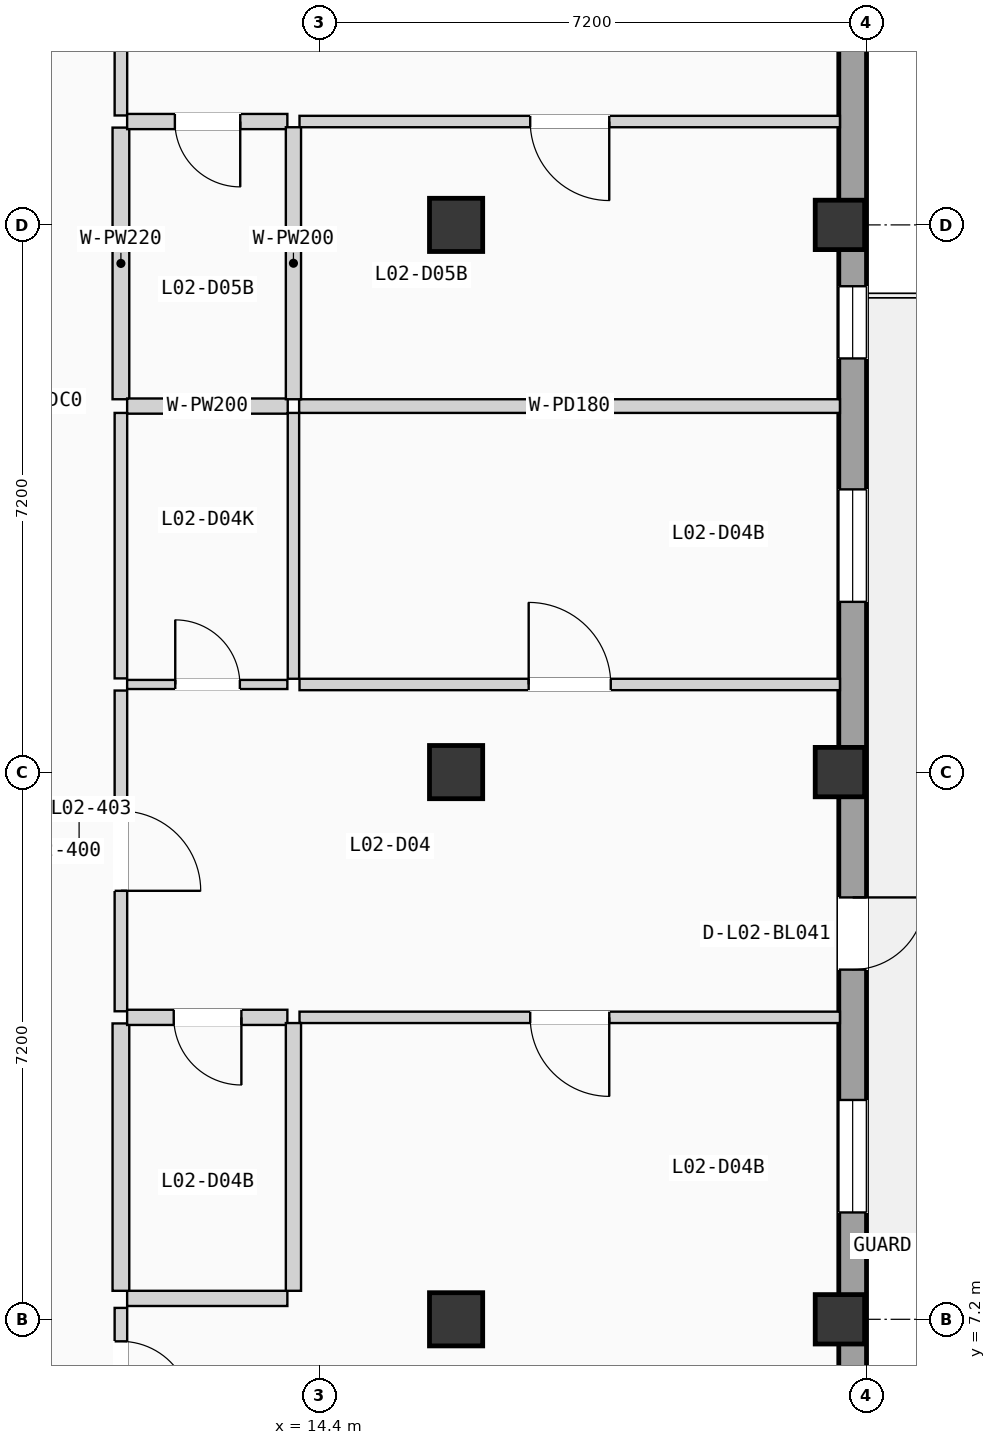
"""IFC4 building model, lengths in metres.
Left out: names, types, materials, properties, quantities, classifications, styles, units other than length and angle.
Written with IfcOpenShell. Run it as: python <this file> out.ifc"""

import sys

from ifc_helpers import new_model, si_unit, direction, frame, frame_2d, origin, origin_2d, place, context, subcontext, project, spatial, rectangle, extrude, element, fill, save


model = new_model("IFC4")
c1 = context("Model", 3, precision=1e-05, world=origin(), true_north=direction((0.0, 1.0)))
c2 = subcontext(c1, "Body", "Model", "MODEL_VIEW")
j1 = project(units=[si_unit("LENGTHUNIT", "METRE"), si_unit("PLANEANGLEUNIT", "RADIAN")], contexts=[c1])
p1 = place(None, origin())
s1 = spatial("IfcSite", under=j1, at=p1, CompositionType="ELEMENT")
p2 = place(p1, origin())
s2 = spatial("IfcBuilding", under=s1, at=p2, CompositionType="ELEMENT")
p3 = place(p2, frame((0.0, 0.0, 8.575)))
s3 = spatial("IfcBuildingStorey", under=s2, at=p3, CompositionType="ELEMENT", Elevation=8.575)
for number, where, z_axis, x_axis in (
    (1, (16.2, 7.2, 0.0), (0.0, 0.0, 1.0), (1.0, 0.0, 0.0)),
    (2, (16.2, 14.4, 0.0), (0.0, 0.0, 1.0), (1.0, 0.0, 0.0)),
    (3, (16.2, 21.6, 0.0), (0.0, 0.0, 1.0), (1.0, 0.0, 0.0)),
):
    element("IfcColumn", number, at=place(p3, frame(where, z_axis=z_axis, x_axis=x_axis)), inside=s3, PredefinedType="COLUMN", context=c2, shape_type="SweptSolid", body=[
        extrude(rectangle(XDim=0.7, YDim=0.7, at=origin_2d()), origin(), (0.0, 0.0, 1.0), 3.5),
    ])
for number, where, z_axis, x_axis in (
    (4, (21.25, 7.2, 0.0), (0.0, 0.0, 1.0), (1.0, 0.0, 0.0)),
    (5, (21.25, 14.4, 0.0), (0.0, 0.0, 1.0), (1.0, 0.0, 0.0)),
    (6, (21.25, 21.6, 0.0), (0.0, 0.0, 1.0), (1.0, 0.0, 0.0)),
):
    element("IfcColumn", number, at=place(p3, frame(where, z_axis=z_axis, x_axis=x_axis)), inside=s3, PredefinedType="COLUMN", context=c2, shape_type="SweptSolid", body=[
        extrude(rectangle(XDim=0.65, YDim=0.65, at=origin_2d()), origin(), (0.0, 0.0, 1.0), 3.5),
    ])
p4 = place(p3, frame((21.417, 0.365, 0.0), z_axis=(0.0, 0.0, 1.0), x_axis=(0.0, 1.0, 0.0)))
e7 = element("IfcWall", 7, at=p4, inside=s3, PredefinedType="SOLIDWALL", context=c2, shape_type="SweptSolid", body=[
    extrude(rectangle(XDim=49.67, YDim=0.365, at=frame_2d((24.835, 0.0))), origin(), (0.0, 0.0, 1.0), 3.24),
])
p5 = place(p4, frame((11.436, 0.0, 0.0)))
e8 = element("IfcOpeningElement", 8, at=p5, cuts=e7, PredefinedType="OPENING", context=c2, shape_type="SweptSolid", body=[
    extrude(rectangle(XDim=0.95, YDim=2.15, at=frame_2d((0.475, 1.075))), frame((0.0, 0.192, 0.0), z_axis=(0.0, -1.0, 0.0), x_axis=(1.0, 0.0, 0.0)), (0.0, 0.0, 1.0), 0.385),
])
p6 = place(p4, frame((8.241, 0.0, 0.9)))
e9 = element("IfcOpeningElement", 9, at=p6, cuts=e7, PredefinedType="OPENING", context=c2, shape_type="SweptSolid", body=[
    extrude(rectangle(XDim=1.48, YDim=1.65, at=frame_2d((0.74, 0.825))), frame((0.0, 0.192, 0.0), z_axis=(0.0, -1.0, 0.0), x_axis=(1.0, 0.0, 0.0)), (0.0, 0.0, 1.0), 0.385),
])
p7 = place(p4, frame((16.275, 0.0, 0.755)))
e10 = element("IfcOpeningElement", 10, at=p7, cuts=e7, PredefinedType="OPENING", context=c2, shape_type="SweptSolid", body=[
    extrude(rectangle(XDim=1.48, YDim=1.8, at=frame_2d((0.74, 0.9))), frame((0.0, 0.192, 0.0), z_axis=(0.0, -1.0, 0.0), x_axis=(1.0, 0.0, 0.0)), (0.0, 0.0, 1.0), 0.385),
])
p8 = place(p4, frame((24.035, 0.0, 0.9)))
e11 = element("IfcOpeningElement", 11, at=p8, cuts=e7, PredefinedType="OPENING", context=c2, shape_type="SweptSolid", body=[
    extrude(rectangle(XDim=1.6, YDim=1.2, at=frame_2d((0.8, 0.6))), frame((0.0, 0.192, 0.0), z_axis=(0.0, -1.0, 0.0), x_axis=(1.0, 0.0, 0.0)), (0.0, 0.0, 1.0), 0.385),
])
p9 = place(p4, frame((19.478, 0.0, 0.85)))
e12 = element("IfcOpeningElement", 12, at=p9, cuts=e7, PredefinedType="OPENING", context=c2, shape_type="SweptSolid", body=[
    extrude(rectangle(XDim=0.95, YDim=1.2, at=frame_2d((0.475, 0.6))), frame((0.0, 0.192, 0.0), z_axis=(0.0, -1.0, 0.0), x_axis=(1.0, 0.0, 0.0)), (0.0, 0.0, 1.0), 0.385),
])
p10 = place(p4, frame((29.242, 0.0, 0.85)))
e13 = element("IfcOpeningElement", 13, at=p10, cuts=e7, PredefinedType="OPENING", context=c2, shape_type="SweptSolid", body=[
    extrude(rectangle(XDim=0.95, YDim=1.2, at=frame_2d((0.475, 0.6))), frame((0.0, 0.192, 0.0), z_axis=(0.0, -1.0, 0.0), x_axis=(1.0, 0.0, 0.0)), (0.0, 0.0, 1.0), 0.385),
])
p11 = place(p4, frame((37.218, 0.0, 0.0)))
e14 = element("IfcOpeningElement", 14, at=p11, cuts=e7, PredefinedType="OPENING", context=c2, shape_type="SweptSolid", body=[
    extrude(rectangle(XDim=1.08, YDim=2.18, at=frame_2d((0.54, 1.09))), frame((0.0, 0.192, 0.0), z_axis=(0.0, -1.0, 0.0), x_axis=(1.0, 0.0, 0.0)), (0.0, 0.0, 1.0), 0.385),
])
p12 = place(p4, frame((31.856, 0.0, 0.9)))
e15 = element("IfcOpeningElement", 15, at=p12, cuts=e7, PredefinedType="OPENING", context=c2, shape_type="SweptSolid", body=[
    extrude(rectangle(XDim=1.6, YDim=1.65, at=frame_2d((0.8, 0.825))), frame((0.0, 0.192, 0.0), z_axis=(0.0, -1.0, 0.0), x_axis=(1.0, 0.0, 0.0)), (0.0, 0.0, 1.0), 0.385),
])
p13 = place(p4, frame((39.889, 0.0, 0.755)))
e16 = element("IfcOpeningElement", 16, at=p13, cuts=e7, PredefinedType="OPENING", context=c2, shape_type="SweptSolid", body=[
    extrude(rectangle(XDim=1.6, YDim=1.8, at=frame_2d((0.8, 0.9))), frame((0.0, 0.192, 0.0), z_axis=(0.0, -1.0, 0.0), x_axis=(1.0, 0.0, 0.0)), (0.0, 0.0, 1.0), 0.385),
])
p14 = place(p3, frame((11.79, 5.53, 0.0), z_axis=(0.0, 0.0, 1.0), x_axis=(0.0, 1.0, 0.0)))
e17 = element("IfcWall", 17, at=p14, inside=s3, PredefinedType="PARTITIONING", context=c2, shape_type="SweptSolid", body=[
    extrude(rectangle(XDim=1.82, YDim=0.165, at=frame_2d((0.91, 0.0))), origin(), (0.0, 0.0, 1.0), 3.22),
])
p15 = place(p14, frame((0.46, 0.0, 0.0)))
e18 = element("IfcOpeningElement", 18, at=p15, cuts=e17, PredefinedType="OPENING", context=c2, shape_type="SweptSolid", body=[
    extrude(rectangle(XDim=0.92, YDim=2.04, at=frame_2d((0.46, 1.02))), frame((0.0, 0.093, 0.0), z_axis=(0.0, -1.0, 0.0), x_axis=(1.0, 0.0, 0.0)), (0.0, 0.0, 1.0), 0.185),
])
p16 = place(p3, frame((11.872, 7.475, 0.0), z_axis=(0.0, 0.0, 1.0), x_axis=(1.0, 0.0, 0.0)))
e19 = element("IfcWall", 19, at=p16, inside=s3, PredefinedType="PLUMBINGWALL", context=c2, shape_type="SweptSolid", body=[
    extrude(rectangle(XDim=2.108, YDim=0.2, at=frame_2d((1.054, 0.0))), origin(), (0.0, 0.0, 1.0), 3.22),
])
p17 = place(p3, frame((11.79, 11.253, 0.0), z_axis=(0.0, 0.0, 1.0), x_axis=(0.0, 1.0, 0.0)))
e20 = element("IfcWall", 20, at=p17, inside=s3, PredefinedType="PARTITIONING", context=c2, shape_type="SweptSolid", body=[
    extrude(rectangle(XDim=4.22, YDim=0.165, at=frame_2d((2.11, 0.0))), origin(), (0.0, 0.0, 1.0), 3.22),
])
p18 = place(p17, frame((1.585, 0.0, 0.0)))
e21 = element("IfcOpeningElement", 21, at=p18, cuts=e20, PredefinedType="OPENING", context=c2, shape_type="SweptSolid", body=[
    extrude(rectangle(XDim=1.05, YDim=2.13, at=frame_2d((0.525, 1.065))), frame((0.0, 0.093, 0.0), z_axis=(0.0, -1.0, 0.0), x_axis=(1.0, 0.0, 0.0)), (0.0, 0.0, 1.0), 0.185),
])
p19 = place(p3, frame((11.79, 7.575, 0.0), z_axis=(0.0, 0.0, 1.0), x_axis=(0.0, 1.0, 0.0)))
e22 = element("IfcWall", 22, at=p19, inside=s3, PredefinedType="PLUMBINGWALL", context=c2, shape_type="SweptSolid", body=[
    extrude(rectangle(XDim=3.518, YDim=0.22, at=frame_2d((1.759, 0.0))), origin(), (0.0, 0.0, 1.0), 3.22),
])
p20 = place(p3, frame((11.79, 15.633, 0.0), z_axis=(0.0, 0.0, 1.0), x_axis=(0.0, 1.0, 0.0)))
e23 = element("IfcWall", 23, at=p20, inside=s3, PredefinedType="PARTITIONING", context=c2, shape_type="SweptSolid", body=[
    extrude(rectangle(XDim=3.493, YDim=0.165, at=frame_2d((1.747, 0.0))), origin(), (0.0, 0.0, 1.0), 3.22),
])
p21 = place(p3, frame((11.79, 23.04, 0.0), z_axis=(0.0, 0.0, 1.0), x_axis=(0.0, 1.0, 0.0)))
e24 = element("IfcWall", 24, at=p21, inside=s3, PredefinedType="PARTITIONING", context=c2, shape_type="SweptSolid", body=[
    extrude(rectangle(XDim=4.32, YDim=0.165, at=frame_2d((2.16, 0.0))), origin(), (0.0, 0.0, 1.0), 3.22),
])
p22 = place(p21, frame((1.635, 0.0, 0.0)))
e25 = element("IfcOpeningElement", 25, at=p22, cuts=e24, PredefinedType="OPENING", context=c2, shape_type="SweptSolid", body=[
    extrude(rectangle(XDim=1.05, YDim=2.13, at=frame_2d((0.525, 1.065))), frame((0.0, 0.093, 0.0), z_axis=(0.0, -1.0, 0.0), x_axis=(1.0, 0.0, 0.0)), (0.0, 0.0, 1.0), 0.185),
])
p23 = place(p3, frame((11.79, 19.306, 0.0), z_axis=(0.0, 0.0, 1.0), x_axis=(0.0, 1.0, 0.0)))
e26 = element("IfcWall", 26, at=p23, inside=s3, PredefinedType="PLUMBINGWALL", context=c2, shape_type="SweptSolid", body=[
    extrude(rectangle(XDim=3.574, YDim=0.22, at=frame_2d((1.787, 0.0))), origin(), (0.0, 0.0, 1.0), 3.22),
])
p24 = place(p3, frame((11.872, 11.173, 0.0), z_axis=(0.0, 0.0, 1.0), x_axis=(1.0, 0.0, 0.0)))
e27 = element("IfcWall", 27, at=p24, inside=s3, PredefinedType="PLUMBINGWALL", context=c2, shape_type="SweptSolid", body=[
    extrude(rectangle(XDim=2.108, YDim=0.2, at=frame_2d((1.054, 0.0))), origin(), (0.0, 0.0, 1.0), 3.22),
])
p25 = place(p24, frame((0.613, 0.0, 0.0)))
e28 = element("IfcOpeningElement", 28, at=p25, cuts=e27, PredefinedType="OPENING", context=c2, shape_type="SweptSolid", body=[
    extrude(rectangle(XDim=0.89, YDim=2.03, at=frame_2d((0.445, 1.015))), frame((0.0, 0.11, 0.0), z_axis=(0.0, -1.0, 0.0), x_axis=(1.0, 0.0, 0.0)), (0.0, 0.0, 1.0), 0.22),
])
p26 = place(p3, frame((11.872, 15.553, 0.0), z_axis=(0.0, 0.0, 1.0), x_axis=(1.0, 0.0, 0.0)))
e29 = element("IfcWall", 29, at=p26, inside=s3, PredefinedType="PARTITIONING", context=c2, shape_type="SweptSolid", body=[
    extrude(rectangle(XDim=2.108, YDim=0.12, at=frame_2d((1.054, 0.0))), origin(), (0.0, 0.0, 1.0), 3.22),
])
p27 = place(p26, frame((0.633, 0.0, 0.0)))
e30 = element("IfcOpeningElement", 30, at=p27, cuts=e29, PredefinedType="OPENING", context=c2, shape_type="SweptSolid", body=[
    extrude(rectangle(XDim=0.85, YDim=2.01, at=frame_2d((0.425, 1.005))), frame((0.0, 0.07, 0.0), z_axis=(0.0, -1.0, 0.0), x_axis=(1.0, 0.0, 0.0)), (0.0, 0.0, 1.0), 0.14),
])
p28 = place(p3, frame((14.14, 11.173, 0.0), z_axis=(0.0, 0.0, 1.0), x_axis=(1.0, 0.0, 0.0)))
e31 = element("IfcWall", 31, at=p28, inside=s3, PredefinedType="PARTITIONING", context=c2, shape_type="SweptSolid", body=[
    extrude(rectangle(XDim=7.11, YDim=0.15, at=frame_2d((3.555, 0.0))), origin(), (0.0, 0.0, 1.0), 3.22),
])
p29 = place(p28, frame((3.035, 0.0, 0.0)))
e32 = element("IfcOpeningElement", 32, at=p29, cuts=e31, PredefinedType="OPENING", context=c2, shape_type="SweptSolid", body=[
    extrude(rectangle(XDim=1.04, YDim=2.08, at=frame_2d((0.52, 1.04))), frame((0.0, 0.085, 0.0), z_axis=(0.0, -1.0, 0.0), x_axis=(1.0, 0.0, 0.0)), (0.0, 0.0, 1.0), 0.17),
])
p30 = place(p3, frame((14.14, 15.553, 0.0), z_axis=(0.0, 0.0, 1.0), x_axis=(1.0, 0.0, 0.0)))
e33 = element("IfcWall", 33, at=p30, inside=s3, PredefinedType="PARTITIONING", context=c2, shape_type="SweptSolid", body=[
    extrude(rectangle(XDim=7.11, YDim=0.15, at=frame_2d((3.555, 0.0))), origin(), (0.0, 0.0, 1.0), 3.22),
])
p31 = place(p30, frame((3.015, 0.0, 0.0)))
e34 = element("IfcOpeningElement", 34, at=p31, cuts=e33, PredefinedType="OPENING", context=c2, shape_type="SweptSolid", body=[
    extrude(rectangle(XDim=1.08, YDim=2.1, at=frame_2d((0.54, 1.05))), frame((0.0, 0.085, 0.0), z_axis=(0.0, -1.0, 0.0), x_axis=(1.0, 0.0, 0.0)), (0.0, 0.0, 1.0), 0.17),
])
p32 = place(p3, frame((14.06, 7.575, 0.0), z_axis=(0.0, 0.0, 1.0), x_axis=(0.0, 1.0, 0.0)))
e35 = element("IfcWall", 35, at=p32, inside=s3, PredefinedType="PLUMBINGWALL", context=c2, shape_type="SweptSolid", body=[
    extrude(rectangle(XDim=3.523, YDim=0.2, at=frame_2d((1.761, 0.0))), origin(), (0.0, 0.0, 1.0), 3.22),
])
p33 = place(p3, frame((14.06, 15.628, 0.0), z_axis=(0.0, 0.0, 1.0), x_axis=(0.0, 1.0, 0.0)))
e36 = element("IfcWall", 36, at=p33, inside=s3, PredefinedType="PARTITIONING", context=c2, shape_type="SweptSolid", body=[
    extrude(rectangle(XDim=3.498, YDim=0.15, at=frame_2d((1.749, 0.0))), origin(), (0.0, 0.0, 1.0), 3.22),
])
p34 = place(p3, frame((11.872, 19.216, 0.0), z_axis=(0.0, 0.0, 1.0), x_axis=(1.0, 0.0, 0.0)))
e37 = element("IfcWall", 37, at=p34, inside=s3, PredefinedType="PLUMBINGWALL", context=c2, shape_type="SweptSolid", body=[
    extrude(rectangle(XDim=2.113, YDim=0.2, at=frame_2d((1.057, 0.0))), origin(), (0.0, 0.0, 1.0), 3.22),
])
p35 = place(p3, frame((14.135, 19.216, 0.0), z_axis=(0.0, 0.0, 1.0), x_axis=(1.0, 0.0, 0.0)))
e38 = element("IfcWall", 38, at=p35, inside=s3, PredefinedType="PARTITIONING", context=c2, shape_type="SweptSolid", body=[
    extrude(rectangle(XDim=7.115, YDim=0.18, at=frame_2d((3.558, 0.0))), origin(), (0.0, 0.0, 1.0), 3.22),
])
p36 = place(p3, frame((11.872, 22.96, 0.0), z_axis=(0.0, 0.0, 1.0), x_axis=(1.0, 0.0, 0.0)))
e39 = element("IfcWall", 39, at=p36, inside=s3, PredefinedType="PLUMBINGWALL", context=c2, shape_type="SweptSolid", body=[
    extrude(rectangle(XDim=2.108, YDim=0.2, at=frame_2d((1.054, 0.0))), origin(), (0.0, 0.0, 1.0), 3.22),
])
p37 = place(p36, frame((0.628, 0.0, 0.0)))
e40 = element("IfcOpeningElement", 40, at=p37, cuts=e39, PredefinedType="OPENING", context=c2, shape_type="SweptSolid", body=[
    extrude(rectangle(XDim=0.86, YDim=2.0, at=frame_2d((0.43, 1.0))), frame((0.0, 0.11, 0.0), z_axis=(0.0, -1.0, 0.0), x_axis=(1.0, 0.0, 0.0)), (0.0, 0.0, 1.0), 0.22),
])
p38 = place(p3, frame((14.14, 22.96, 0.0), z_axis=(0.0, 0.0, 1.0), x_axis=(1.0, 0.0, 0.0)))
e41 = element("IfcWall", 41, at=p38, inside=s3, PredefinedType="PARTITIONING", context=c2, shape_type="SweptSolid", body=[
    extrude(rectangle(XDim=7.11, YDim=0.15, at=frame_2d((3.555, 0.0))), origin(), (0.0, 0.0, 1.0), 3.22),
])
p39 = place(p38, frame((3.035, 0.0, 0.0)))
e42 = element("IfcOpeningElement", 42, at=p39, cuts=e41, PredefinedType="OPENING", context=c2, shape_type="SweptSolid", body=[
    extrude(rectangle(XDim=1.04, YDim=2.08, at=frame_2d((0.52, 1.04))), frame((0.0, 0.085, 0.0), z_axis=(0.0, -1.0, 0.0), x_axis=(1.0, 0.0, 0.0)), (0.0, 0.0, 1.0), 0.17),
])
p40 = place(p3, frame((14.06, 19.306, 0.0), z_axis=(0.0, 0.0, 1.0), x_axis=(0.0, 1.0, 0.0)))
e43 = element("IfcWall", 43, at=p40, inside=s3, PredefinedType="PLUMBINGWALL", context=c2, shape_type="SweptSolid", body=[
    extrude(rectangle(XDim=3.579, YDim=0.2, at=frame_2d((1.79, 0.0))), origin(), (0.0, 0.0, 1.0), 3.22),
])
p41 = place(p5, frame((0.95, 0.0, 0.0), z_axis=(0.0, 0.0, 1.0), x_axis=(-1.0, 0.0, 0.0)))
e44 = element("IfcDoor", 44, at=p41, inside=s3, OperationType="SINGLE_SWING_RIGHT", PredefinedType="DOOR", context=c2, shape_type="SweptSolid", body=[
    extrude(rectangle(XDim=0.95, YDim=2.15, at=frame_2d((0.475, 1.075))), frame((0.0, 0.025, 0.0), z_axis=(0.0, -1.0, 0.0), x_axis=(1.0, 0.0, 0.0)), (0.0, 0.0, 1.0), 0.05),
])
fill(e8, e44)
p42 = place(p6, origin())
e45 = element("IfcWindow", 45, at=p42, inside=s3, PartitioningType="SINGLE_PANEL", PredefinedType="WINDOW", context=c2, shape_type="SweptSolid", body=[
    extrude(rectangle(XDim=1.48, YDim=1.65, at=frame_2d((0.74, 0.825))), frame((0.0, 0.03, 0.0), z_axis=(0.0, -1.0, 0.0), x_axis=(1.0, 0.0, 0.0)), (0.0, 0.0, 1.0), 0.06),
])
fill(e9, e45)
p43 = place(p7, origin())
e46 = element("IfcWindow", 46, at=p43, inside=s3, PartitioningType="SINGLE_PANEL", PredefinedType="WINDOW", context=c2, shape_type="SweptSolid", body=[
    extrude(rectangle(XDim=1.48, YDim=1.8, at=frame_2d((0.74, 0.9))), frame((0.0, 0.03, 0.0), z_axis=(0.0, -1.0, 0.0), x_axis=(1.0, 0.0, 0.0)), (0.0, 0.0, 1.0), 0.06),
])
fill(e10, e46)
p44 = place(p9, origin())
e47 = element("IfcWindow", 47, at=p44, inside=s3, PartitioningType="SINGLE_PANEL", PredefinedType="WINDOW", context=c2, shape_type="SweptSolid", body=[
    extrude(rectangle(XDim=0.95, YDim=1.2, at=frame_2d((0.475, 0.6))), frame((0.0, 0.03, 0.0), z_axis=(0.0, -1.0, 0.0), x_axis=(1.0, 0.0, 0.0)), (0.0, 0.0, 1.0), 0.06),
])
fill(e12, e47)
p45 = place(p15, frame((0.92, 0.0, 0.0), z_axis=(0.0, 0.0, 1.0), x_axis=(-1.0, 0.0, 0.0)))
e48 = element("IfcDoor", 48, at=p45, inside=s3, OperationType="SINGLE_SWING_LEFT", PredefinedType="DOOR", context=c2, shape_type="SweptSolid", body=[
    extrude(rectangle(XDim=0.92, YDim=2.04, at=frame_2d((0.46, 1.02))), frame((0.0, 0.025, 0.0), z_axis=(0.0, -1.0, 0.0), x_axis=(1.0, 0.0, 0.0)), (0.0, 0.0, 1.0), 0.05),
])
fill(e18, e48)
p46 = place(p18, frame((1.05, 0.0, 0.0), z_axis=(0.0, 0.0, 1.0), x_axis=(-1.0, 0.0, 0.0)))
e49 = element("IfcDoor", 49, at=p46, inside=s3, OperationType="SINGLE_SWING_LEFT", PredefinedType="DOOR", context=c2, shape_type="SweptSolid", body=[
    extrude(rectangle(XDim=1.05, YDim=2.13, at=frame_2d((0.525, 1.065))), frame((0.0, 0.025, 0.0), z_axis=(0.0, -1.0, 0.0), x_axis=(1.0, 0.0, 0.0)), (0.0, 0.0, 1.0), 0.05),
])
fill(e21, e49)
p47 = place(p25, frame((0.89, 0.0, 0.0), z_axis=(0.0, 0.0, 1.0), x_axis=(-1.0, 0.0, 0.0)))
e50 = element("IfcDoor", 50, at=p47, inside=s3, OperationType="SINGLE_SWING_RIGHT", PredefinedType="DOOR", context=c2, shape_type="SweptSolid", body=[
    extrude(rectangle(XDim=0.89, YDim=2.03, at=frame_2d((0.445, 1.015))), frame((0.0, 0.025, 0.0), z_axis=(0.0, -1.0, 0.0), x_axis=(1.0, 0.0, 0.0)), (0.0, 0.0, 1.0), 0.05),
])
fill(e28, e50)
p48 = place(p27, origin())
e51 = element("IfcDoor", 51, at=p48, inside=s3, OperationType="SINGLE_SWING_LEFT", PredefinedType="DOOR", context=c2, shape_type="SweptSolid", body=[
    extrude(rectangle(XDim=0.85, YDim=2.01, at=frame_2d((0.425, 1.005))), frame((0.0, 0.025, 0.0), z_axis=(0.0, -1.0, 0.0), x_axis=(1.0, 0.0, 0.0)), (0.0, 0.0, 1.0), 0.05),
])
fill(e30, e51)
p49 = place(p29, frame((1.04, 0.0, 0.0), z_axis=(0.0, 0.0, 1.0), x_axis=(-1.0, 0.0, 0.0)))
e52 = element("IfcDoor", 52, at=p49, inside=s3, OperationType="SINGLE_SWING_RIGHT", PredefinedType="DOOR", context=c2, shape_type="SweptSolid", body=[
    extrude(rectangle(XDim=1.04, YDim=2.08, at=frame_2d((0.52, 1.04))), frame((0.0, 0.025, 0.0), z_axis=(0.0, -1.0, 0.0), x_axis=(1.0, 0.0, 0.0)), (0.0, 0.0, 1.0), 0.05),
])
fill(e32, e52)
p50 = place(p31, origin())
e53 = element("IfcDoor", 53, at=p50, inside=s3, OperationType="SINGLE_SWING_LEFT", PredefinedType="DOOR", context=c2, shape_type="SweptSolid", body=[
    extrude(rectangle(XDim=1.08, YDim=2.1, at=frame_2d((0.54, 1.05))), frame((0.0, 0.025, 0.0), z_axis=(0.0, -1.0, 0.0), x_axis=(1.0, 0.0, 0.0)), (0.0, 0.0, 1.0), 0.05),
])
fill(e34, e53)
p51 = place(p37, frame((0.86, 0.0, 0.0), z_axis=(0.0, 0.0, 1.0), x_axis=(-1.0, 0.0, 0.0)))
e54 = element("IfcDoor", 54, at=p51, inside=s3, OperationType="SINGLE_SWING_RIGHT", PredefinedType="DOOR", context=c2, shape_type="SweptSolid", body=[
    extrude(rectangle(XDim=0.86, YDim=2.0, at=frame_2d((0.43, 1.0))), frame((0.0, 0.025, 0.0), z_axis=(0.0, -1.0, 0.0), x_axis=(1.0, 0.0, 0.0)), (0.0, 0.0, 1.0), 0.05),
])
fill(e40, e54)
p52 = place(p39, frame((1.04, 0.0, 0.0), z_axis=(0.0, 0.0, 1.0), x_axis=(-1.0, 0.0, 0.0)))
e55 = element("IfcDoor", 55, at=p52, inside=s3, OperationType="SINGLE_SWING_RIGHT", PredefinedType="DOOR", context=c2, shape_type="SweptSolid", body=[
    extrude(rectangle(XDim=1.04, YDim=2.08, at=frame_2d((0.52, 1.04))), frame((0.0, 0.025, 0.0), z_axis=(0.0, -1.0, 0.0), x_axis=(1.0, 0.0, 0.0)), (0.0, 0.0, 1.0), 0.05),
])
fill(e42, e55)
save(model, sys.argv[1])
